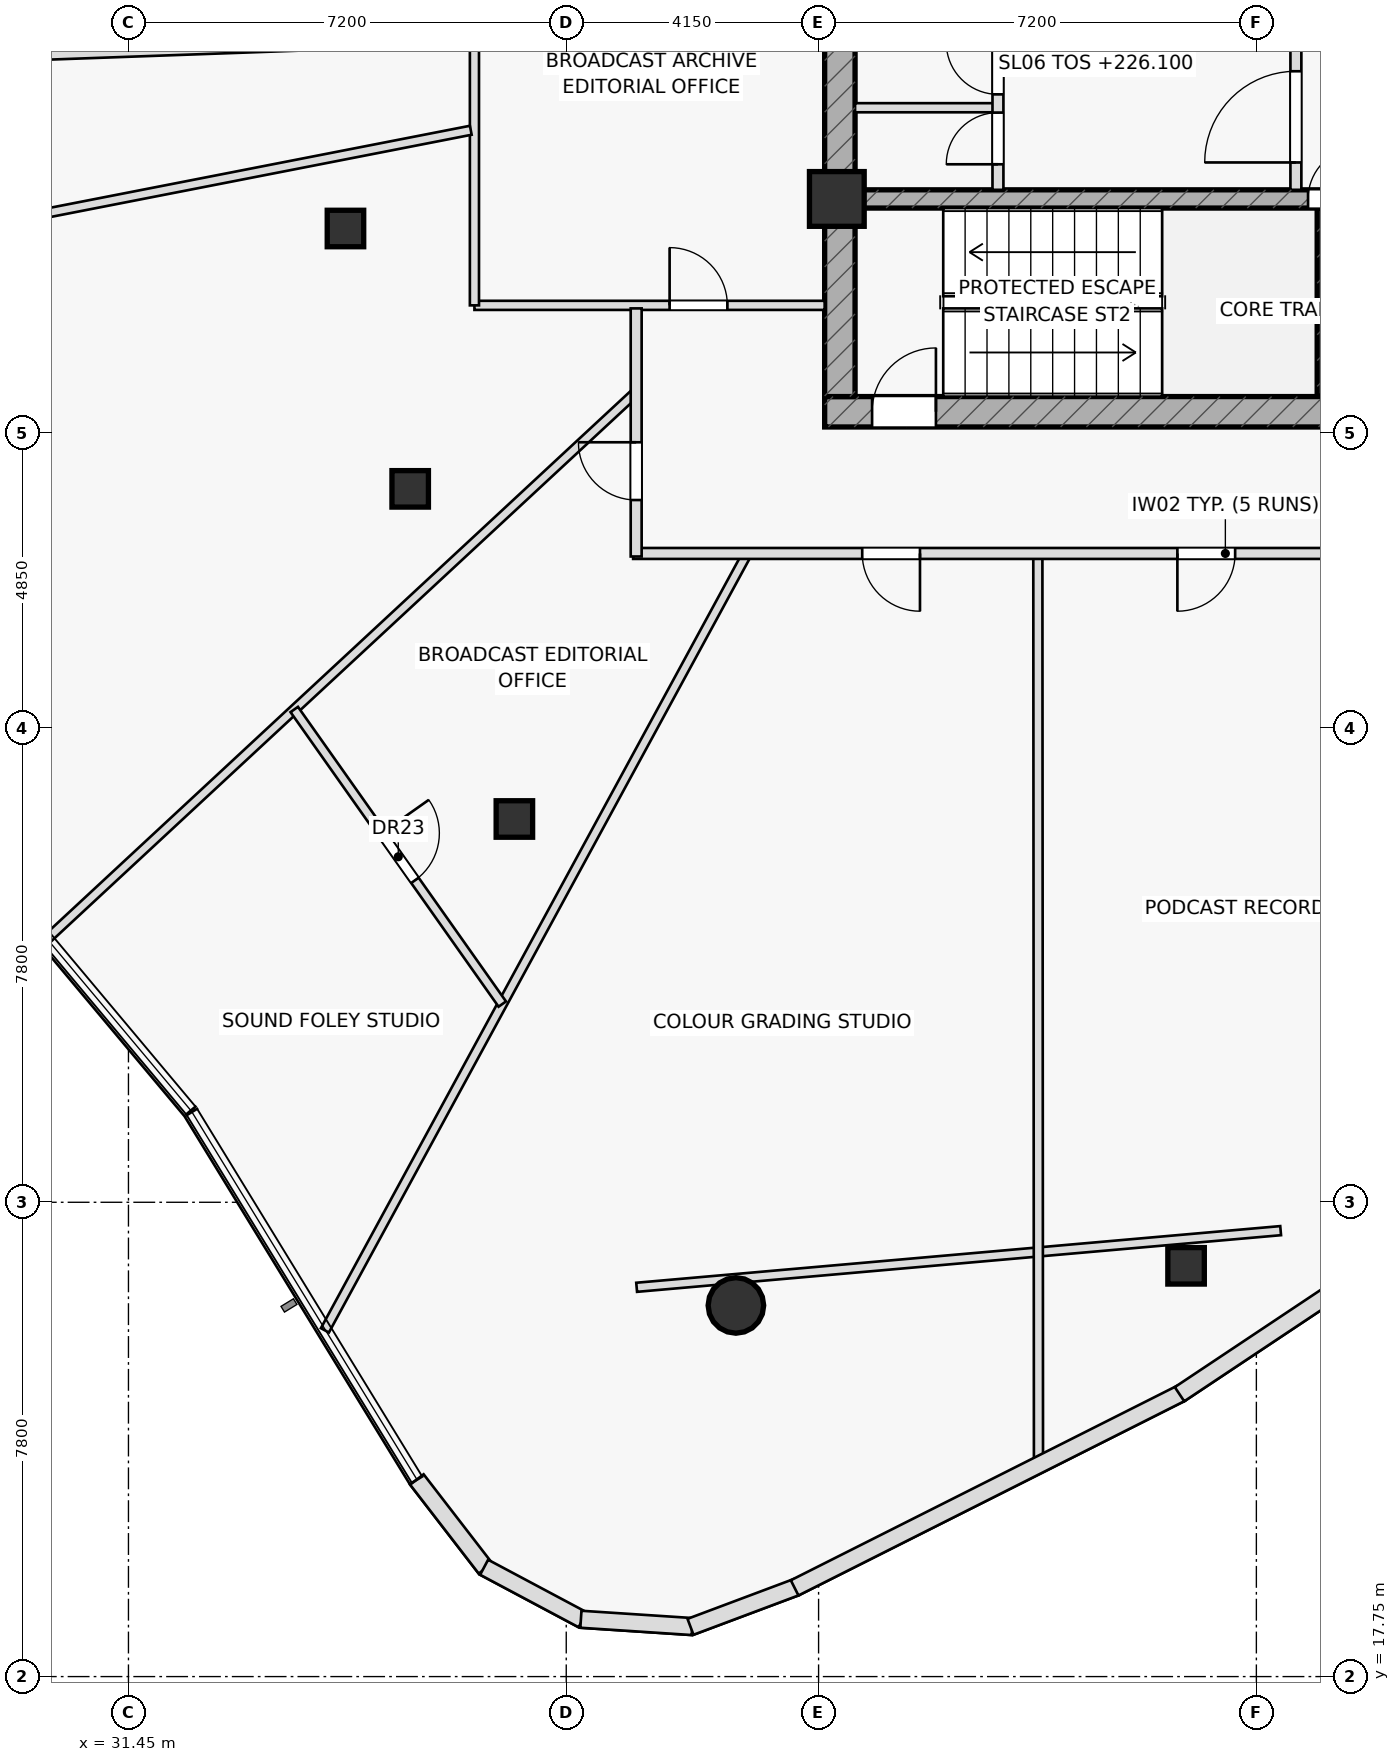
"""IFC4 building model, lengths in metres.
Left out: names, types, materials, properties, quantities, classifications, styles, units other than length and angle.
Written with IfcOpenShell. Run it as: python <this file> out.ifc"""

import sys

from ifc_helpers import new_model, si_unit, direction, frame, frame_2d, origin, origin_2d, place, context, subcontext, project, spatial, rectangle, hollow_rectangle, hollow_circle, extrude, element, fill, save


model = new_model("IFC4")
c1 = context("Model", 3, precision=1e-05, world=origin(), true_north=direction((0.0, 1.0)))
c2 = subcontext(c1, "Body", "Model", "MODEL_VIEW")
j1 = project(units=[si_unit("LENGTHUNIT", "METRE"), si_unit("PLANEANGLEUNIT", "RADIAN")], contexts=[c1])
p1 = place(None, origin())
s1 = spatial("IfcSite", under=j1, at=p1, CompositionType="ELEMENT")
p2 = place(p1, origin())
s2 = spatial("IfcBuilding", under=s1, at=p2, CompositionType="ELEMENT")
p3 = place(p2, frame((0.0, 0.0, 226.1)))
s3 = spatial("IfcBuildingStorey", under=s2, at=p3, CompositionType="ELEMENT", Elevation=226.1)
p4 = place(p3, frame((51.11, 38.8, 0.0), z_axis=(0.0, 0.0, 1.0), x_axis=(0.0, 1.0, 0.0)))
e1 = element("IfcWall", 1, at=p4, inside=s3, PredefinedType="SHEAR", context=c2, shape_type="SweptSolid", body=[
    extrude(rectangle(XDim=3.1, YDim=0.22, at=frame_2d((1.55, 0.0))), origin(), (0.0, 0.0, 1.0), 3.65),
])
p5 = place(p3, frame((42.9, 38.55, 0.0), z_axis=(0.0, 0.0, 1.0), x_axis=(1.0, 0.0, 0.0)))
e2 = element("IfcWall", 2, at=p5, inside=s3, PredefinedType="SHEAR", context=c2, shape_type="SweptSolid", body=[
    extrude(rectangle(XDim=14.2, YDim=0.5, at=frame_2d((7.1, 0.0))), origin(), (0.0, 0.0, 1.0), 3.65),
])
p6 = place(p5, frame((0.78, 0.0, 0.0)))
e3 = element("IfcOpeningElement", 3, at=p6, cuts=e2, PredefinedType="OPENING", context=c2, shape_type="SweptSolid", body=[
    extrude(rectangle(XDim=1.05, YDim=2.2, at=frame_2d((0.525, 1.1))), frame((0.0, 0.26, 0.0), z_axis=(0.0, -1.0, 0.0), x_axis=(1.0, 0.0, 0.0)), (0.0, 0.0, 1.0), 0.52),
])
p7 = place(p3, frame((43.15, 38.8, 0.0), z_axis=(0.0, 0.0, 1.0), x_axis=(0.0, 1.0, 0.0)))
e4 = element("IfcWall", 4, at=p7, inside=s3, PredefinedType="SHEAR", context=c2, shape_type="SweptSolid", body=[
    extrude(rectangle(XDim=12.4, YDim=0.5, at=frame_2d((6.2, 0.0))), origin(), (0.0, 0.0, 1.0), 3.65),
])
p8 = place(p3, frame((43.4, 42.05, 0.0), z_axis=(0.0, 0.0, 1.0), x_axis=(1.0, 0.0, 0.0)))
e5 = element("IfcWall", 5, at=p8, inside=s3, PredefinedType="SHEAR", context=c2, shape_type="SweptSolid", body=[
    extrude(rectangle(XDim=13.2, YDim=0.3, at=frame_2d((6.6, 0.0))), origin(), (0.0, 0.0, 1.0), 3.65),
])
p9 = place(p8, frame((7.45, 0.0, 0.0)))
e6 = element("IfcOpeningElement", 6, at=p9, cuts=e5, PredefinedType="OPENING", context=c2, shape_type="SweptSolid", body=[
    extrude(rectangle(XDim=0.85, YDim=2.05, at=frame_2d((0.425, 1.025))), frame((0.0, 0.16, 0.0), z_axis=(0.0, -1.0, 0.0), x_axis=(1.0, 0.0, 0.0)), (0.0, 0.0, 1.0), 0.32),
])
p10 = place(p8, frame((9.5, 0.0, 0.0)))
e7 = element("IfcOpeningElement", 7, at=p10, cuts=e5, PredefinedType="OPENING", context=c2, shape_type="SweptSolid", body=[
    extrude(rectangle(XDim=0.85, YDim=2.05, at=frame_2d((0.425, 1.025))), frame((0.0, 0.16, 0.0), z_axis=(0.0, -1.0, 0.0), x_axis=(1.0, 0.0, 0.0)), (0.0, 0.0, 1.0), 0.32),
])
p11 = place(p8, frame((11.6, 0.0, 0.0)))
e8 = element("IfcOpeningElement", 8, at=p11, cuts=e5, PredefinedType="OPENING", context=c2, shape_type="SweptSolid", body=[
    extrude(rectangle(XDim=0.85, YDim=2.05, at=frame_2d((0.425, 1.025))), frame((0.0, 0.16, 0.0), z_axis=(0.0, -1.0, 0.0), x_axis=(1.0, 0.0, 0.0)), (0.0, 0.0, 1.0), 0.32),
])
p12 = place(p3, frame((43.1, 42.05, 0.0), z_axis=(0.0, 0.0, 1.0), x_axis=(1.0, 0.0, 0.0)))
e9 = element("IfcColumn", 9, at=p12, inside=s3, PredefinedType="COLUMN", context=c2, shape_type="SweptSolid", body=[
    extrude(rectangle(XDim=0.9, YDim=0.9, at=origin_2d()), origin(), (0.0, 0.0, 1.0), 3.65),
])
for number, where, z_axis, x_axis in (
    (10, (35.019, 41.564, 0.0), (0.0, 0.0, 1.0), (1.0, 0.0, 0.0)),
    (11, (36.083, 37.282, 0.0), (0.0, 0.0, 1.0), (1.0, 0.0, 0.0)),
    (12, (37.797, 31.853, 0.0), (0.0, 0.0, 1.0), (1.0, 0.0, 0.0)),
):
    element("IfcColumn", number, at=place(p3, frame(where, z_axis=z_axis, x_axis=x_axis)), inside=s3, PredefinedType="COLUMN", context=c2, shape_type="SweptSolid", body=[
        extrude(hollow_rectangle(XDim=0.6, YDim=0.6, WallThickness=0.036, at=origin_2d()), origin(), (0.0, 0.0, 1.0), 3.65),
    ])
p13 = place(p3, frame((41.44, 23.854, 0.0), z_axis=(0.0, 0.0, 1.0), x_axis=(1.0, 0.0, 0.0)))
e13 = element("IfcColumn", 13, at=p13, inside=s3, PredefinedType="COLUMN", context=c2, shape_type="SweptSolid", body=[
    extrude(hollow_circle(Radius=0.457, WallThickness=0.04, at=origin_2d()), origin(), (0.0, 0.0, 1.0), 3.65),
])
p14 = place(p3, frame((48.844, 24.505, 0.0), z_axis=(0.0, 0.0, 1.0), x_axis=(1.0, 0.0, 0.0)))
e14 = element("IfcColumn", 14, at=p14, inside=s3, PredefinedType="COLUMN", context=c2, shape_type="SweptSolid", body=[
    extrude(hollow_rectangle(XDim=0.6, YDim=0.6, WallThickness=0.036, at=origin_2d()), origin(), (0.0, 0.0, 1.0), 3.65),
])
p15 = place(p3, frame((50.65, 42.2, 0.0), z_axis=(0.0, 0.0, 1.0), x_axis=(0.0, 1.0, 0.0)))
e15 = element("IfcWall", 15, at=p15, inside=s3, PredefinedType="PARTITIONING", context=c2, shape_type="SweptSolid", body=[
    extrude(rectangle(XDim=2.85, YDim=0.18, at=frame_2d((1.425, 0.0))), origin(), (0.0, 0.0, 1.0), 3.65),
])
p16 = place(p15, frame((0.45, 0.0, 0.0)))
e16 = element("IfcOpeningElement", 16, at=p16, cuts=e15, PredefinedType="OPENING", context=c2, shape_type="SweptSolid", body=[
    extrude(rectangle(XDim=1.5, YDim=2.2, at=frame_2d((0.75, 1.1))), frame((0.0, 0.1, 0.0), z_axis=(0.0, -1.0, 0.0), x_axis=(1.0, 0.0, 0.0)), (0.0, 0.0, 1.0), 0.2),
])
p17 = place(p3, frame((43.4, 43.55, 0.0), z_axis=(0.0, 0.0, 1.0), x_axis=(1.0, 0.0, 0.0)))
e17 = element("IfcWall", 17, at=p17, inside=s3, PredefinedType="PARTITIONING", context=c2, shape_type="SweptSolid", body=[
    extrude(rectangle(XDim=2.35, YDim=0.15, at=frame_2d((1.175, 0.0))), origin(), (0.0, 0.0, 1.0), 3.65),
])
p18 = place(p3, frame((45.75, 42.2, 0.0), z_axis=(0.0, 0.0, 1.0), x_axis=(0.0, 1.0, 0.0)))
e18 = element("IfcWall", 18, at=p18, inside=s3, PredefinedType="PARTITIONING", context=c2, shape_type="SweptSolid", body=[
    extrude(rectangle(XDim=5.6, YDim=0.18, at=frame_2d((2.8, 0.0))), origin(), (0.0, 0.0, 1.0), 3.65),
])
p19 = place(p18, frame((0.42, 0.0, 0.0)))
e19 = element("IfcOpeningElement", 19, at=p19, cuts=e18, PredefinedType="OPENING", context=c2, shape_type="SweptSolid", body=[
    extrude(rectangle(XDim=0.85, YDim=2.05, at=frame_2d((0.425, 1.025))), frame((0.0, 0.1, 0.0), z_axis=(0.0, -1.0, 0.0), x_axis=(1.0, 0.0, 0.0)), (0.0, 0.0, 1.0), 0.2),
])
p20 = place(p18, frame((1.57, 0.0, 0.0)))
e20 = element("IfcOpeningElement", 20, at=p20, cuts=e18, PredefinedType="OPENING", context=c2, shape_type="SweptSolid", body=[
    extrude(rectangle(XDim=0.85, YDim=2.05, at=frame_2d((0.425, 1.025))), frame((0.0, 0.1, 0.0), z_axis=(0.0, -1.0, 0.0), x_axis=(1.0, 0.0, 0.0)), (0.0, 0.0, 1.0), 0.2),
])
p21 = place(p18, frame((2.8, 0.0, 0.0)))
e21 = element("IfcOpeningElement", 21, at=p21, cuts=e18, PredefinedType="OPENING", context=c2, shape_type="SweptSolid", body=[
    extrude(rectangle(XDim=0.9, YDim=2.05, at=frame_2d((0.45, 1.025))), frame((0.0, 0.1, 0.0), z_axis=(0.0, -1.0, 0.0), x_axis=(1.0, 0.0, 0.0)), (0.0, 0.0, 1.0), 0.2),
])
p22 = place(p3, frame((39.808, 24.152, 0.0), z_axis=(0.0, 0.0, 1.0), x_axis=(0.996153584085, 0.087624408208, 0.0)))
e22 = element("IfcWall", 22, at=p22, inside=s3, PredefinedType="PARTITIONING", context=c2, shape_type="SweptSolid", body=[
    extrude(rectangle(XDim=10.632, YDim=0.15, at=frame_2d((5.316, 0.0))), origin(), (0.0, 0.0, 1.0), 3.135),
])
p23 = place(p3, frame((37.14, 40.3, 0.0), z_axis=(0.0, 0.0, 1.0), x_axis=(1.0, 0.0, 0.0)))
e23 = element("IfcWall", 23, at=p23, inside=s3, PredefinedType="PARTITIONING", context=c2, shape_type="SweptSolid", body=[
    extrude(rectangle(XDim=5.76, YDim=0.15, at=frame_2d((2.88, 0.0))), origin(), (0.0, 0.0, 1.0), 3.025),
])
p24 = place(p23, frame((3.21, 0.0, 0.0)))
e24 = element("IfcOpeningElement", 24, at=p24, cuts=e23, PredefinedType="OPENING", context=c2, shape_type="SweptSolid", body=[
    extrude(rectangle(XDim=0.95, YDim=2.05, at=frame_2d((0.475, 1.025))), frame((0.0, 0.085, 0.0), z_axis=(0.0, -1.0, 0.0), x_axis=(1.0, 0.0, 0.0)), (0.0, 0.0, 1.0), 0.17),
])
p25 = place(p3, frame((37.14, 40.3, 0.0), z_axis=(0.0, 0.0, 1.0), x_axis=(0.0, 1.0, 0.0)))
e25 = element("IfcWall", 25, at=p25, inside=s3, PredefinedType="PARTITIONING", context=c2, shape_type="SweptSolid", body=[
    extrude(rectangle(XDim=7.58, YDim=0.15, at=frame_2d((3.79, 0.0))), origin(), (0.0, 0.0, 1.0), 3.65),
])
p26 = place(p3, frame((37.08, 44.665, 0.0), z_axis=(0.0, 0.0, 1.0), x_axis=(-0.999354882677, -0.035914042805, 0.0)))
e26 = element("IfcWall", 26, at=p26, inside=s3, PredefinedType="PARTITIONING", context=c2, shape_type="SweptSolid", body=[
    extrude(rectangle(XDim=12.562, YDim=0.15, at=frame_2d((6.281, 0.0))), origin(), (0.0, 0.0, 1.0), 3.135),
])
p27 = place(p3, frame((37.08, 43.179, 0.0), z_axis=(0.0, 0.0, 1.0), x_axis=(-0.981454920946, -0.19169308321, 0.0)))
e27 = element("IfcWall", 27, at=p27, inside=s3, PredefinedType="PARTITIONING", context=c2, shape_type="SweptSolid", body=[
    extrude(rectangle(XDim=12.149, YDim=0.15, at=frame_2d((6.074, 0.0))), origin(), (0.0, 0.0, 1.0), 3.135),
])
p28 = place(p3, frame((39.8, 38.874, 0.0), z_axis=(0.0, 0.0, 1.0), x_axis=(-0.732917057611, -0.680318004071, 0.0)))
e28 = element("IfcWall", 28, at=p28, inside=s3, PredefinedType="PARTITIONING", context=c2, shape_type="SweptSolid", body=[
    extrude(rectangle(XDim=13.228, YDim=0.15, at=frame_2d((6.614, 0.0))), origin(), (0.0, 0.0, 1.0), 3.025),
])
p29 = place(p3, frame((41.627, 36.22, 0.0), z_axis=(0.0, 0.0, 1.0), x_axis=(-0.477626014046, -0.878563253674, 0.0)))
e29 = element("IfcWall", 29, at=p29, inside=s3, PredefinedType="PARTITIONING", context=c2, shape_type="SweptSolid", body=[
    extrude(rectangle(XDim=14.542, YDim=0.15, at=frame_2d((7.271, 0.0))), origin(), (0.0, 0.0, 1.0), 3.135),
])
p30 = place(p3, frame((46.406, 36.22, 0.0), z_axis=(0.0, 0.0, 1.0), x_axis=(0.000683437859, -0.999999766456, 0.0)))
e30 = element("IfcWall", 30, at=p30, inside=s3, PredefinedType="PARTITIONING", context=c2, shape_type="SweptSolid", body=[
    extrude(rectangle(XDim=15.003, YDim=0.15, at=frame_2d((7.502, 0.0))), origin(), (0.0, 0.0, 1.0), 3.025),
])
p31 = place(p3, frame((34.177, 33.654, 0.0), z_axis=(0.0, 0.0, 1.0), x_axis=(0.57689975021, -0.816814959588, 0.0)))
e31 = element("IfcWall", 31, at=p31, inside=s3, PredefinedType="PARTITIONING", context=c2, shape_type="SweptSolid", body=[
    extrude(rectangle(XDim=5.931, YDim=0.15, at=frame_2d((2.965, 0.0))), origin(), (0.0, 0.0, 1.0), 3.65),
])
p32 = place(p31, frame((2.49, 0.0, 0.0)))
e32 = element("IfcOpeningElement", 32, at=p32, cuts=e31, PredefinedType="OPENING", context=c2, shape_type="SweptSolid", body=[
    extrude(rectangle(XDim=0.95, YDim=2.05, at=frame_2d((0.475, 1.025))), frame((0.0, 0.085, 0.0), z_axis=(0.0, -1.0, 0.0), x_axis=(1.0, 0.0, 0.0)), (0.0, 0.0, 1.0), 0.17),
])
p33 = place(p3, frame((59.23, 36.22, 0.0), z_axis=(0.0, 0.0, 1.0), x_axis=(-1.0, 0.0, 0.0)))
e33 = element("IfcWall", 33, at=p33, inside=s3, PredefinedType="PARTITIONING", context=c2, shape_type="SweptSolid", body=[
    extrude(rectangle(XDim=19.48, YDim=0.18, at=frame_2d((9.74, 0.0))), origin(), (0.0, 0.0, 1.0), 3.025),
])
p34 = place(p33, frame((3.666, 0.0, 0.0)))
e34 = element("IfcOpeningElement", 34, at=p34, cuts=e33, PredefinedType="OPENING", context=c2, shape_type="SweptSolid", body=[
    extrude(rectangle(XDim=0.95, YDim=2.05, at=frame_2d((0.475, 1.025))), frame((0.0, 0.1, 0.0), z_axis=(0.0, -1.0, 0.0), x_axis=(1.0, 0.0, 0.0)), (0.0, 0.0, 1.0), 0.2),
])
p35 = place(p33, frame((9.579, 0.0, 0.0)))
e35 = element("IfcOpeningElement", 35, at=p35, cuts=e33, PredefinedType="OPENING", context=c2, shape_type="SweptSolid", body=[
    extrude(rectangle(XDim=0.95, YDim=2.05, at=frame_2d((0.475, 1.025))), frame((0.0, 0.1, 0.0), z_axis=(0.0, -1.0, 0.0), x_axis=(1.0, 0.0, 0.0)), (0.0, 0.0, 1.0), 0.2),
])
p36 = place(p33, frame((14.762, 0.0, 0.0)))
e36 = element("IfcOpeningElement", 36, at=p36, cuts=e33, PredefinedType="OPENING", context=c2, shape_type="SweptSolid", body=[
    extrude(rectangle(XDim=0.95, YDim=2.05, at=frame_2d((0.475, 1.025))), frame((0.0, 0.1, 0.0), z_axis=(0.0, -1.0, 0.0), x_axis=(1.0, 0.0, 0.0)), (0.0, 0.0, 1.0), 0.2),
])
p37 = place(p3, frame((39.8, 36.17, 0.0), z_axis=(0.0, 0.0, 1.0), x_axis=(0.0, 1.0, 0.0)))
e37 = element("IfcWall", 37, at=p37, inside=s3, PredefinedType="PARTITIONING", context=c2, shape_type="SweptSolid", body=[
    extrude(rectangle(XDim=4.08, YDim=0.18, at=frame_2d((2.04, 0.0))), origin(), (0.0, 0.0, 1.0), 3.325),
])
p38 = place(p37, frame((0.929, 0.0, 0.0)))
e38 = element("IfcOpeningElement", 38, at=p38, cuts=e37, PredefinedType="OPENING", context=c2, shape_type="SweptSolid", body=[
    extrude(rectangle(XDim=0.95, YDim=2.05, at=frame_2d((0.475, 1.025))), frame((0.0, 0.1, 0.0), z_axis=(0.0, -1.0, 0.0), x_axis=(1.0, 0.0, 0.0)), (0.0, 0.0, 1.0), 0.2),
])
p39 = place(p3, frame((36.193, 20.991, 0.0), z_axis=(0.0, 0.0, 1.0), x_axis=(0.610815292471, -0.791773123112, 0.0)))
e39 = element("IfcWall", 39, at=p39, inside=s3, PredefinedType="STANDARD", context=c2, shape_type="SweptSolid", body=[
    extrude(rectangle(XDim=1.847, YDim=0.28, at=frame_2d((0.923, 0.0))), origin(), (0.0, 0.0, 1.0), 3.65),
])
p40 = place(p3, frame((37.299, 19.548, 0.0), z_axis=(0.0, 0.0, 1.0), x_axis=(0.882555373854, -0.470208477253, 0.0)))
e40 = element("IfcWall", 40, at=p40, inside=s3, PredefinedType="STANDARD", context=c2, shape_type="SweptSolid", body=[
    extrude(rectangle(XDim=1.835, YDim=0.28, at=frame_2d((0.918, 0.0))), origin(), (0.0, 0.0, 1.0), 3.65),
])
p41 = place(p3, frame((38.891, 18.693, 0.0), z_axis=(0.0, 0.0, 1.0), x_axis=(0.997855809763, -0.065450614372, 0.0)))
e41 = element("IfcWall", 41, at=p41, inside=s3, PredefinedType="STANDARD", context=c2, shape_type="SweptSolid", body=[
    extrude(rectangle(XDim=1.835, YDim=0.28, at=frame_2d((0.917, 0.0))), origin(), (0.0, 0.0, 1.0), 3.65),
])
p42 = place(p3, frame((40.694, 18.569, 0.0), z_axis=(0.0, 0.0, 1.0), x_axis=(0.936383168039, 0.350979433319, 0.0)))
e42 = element("IfcWall", 42, at=p42, inside=s3, PredefinedType="STANDARD", context=c2, shape_type="SweptSolid", body=[
    extrude(rectangle(XDim=1.858, YDim=0.28, at=frame_2d((0.929, 0.0))), origin(), (0.0, 0.0, 1.0), 3.65),
])
p43 = place(p3, frame((42.406, 19.209, 0.0), z_axis=(0.0, 0.0, 1.0), x_axis=(0.893181734269, 0.449695885648, 0.0)))
e43 = element("IfcWall", 43, at=p43, inside=s3, PredefinedType="STANDARD", context=c2, shape_type="SweptSolid", body=[
    extrude(rectangle(XDim=7.116, YDim=0.28, at=frame_2d((3.558, 0.0))), origin(), (0.0, 0.0, 1.0), 3.65),
])
p44 = place(p3, frame((48.736, 22.394, 0.0), z_axis=(0.0, 0.0, 1.0), x_axis=(0.832187740949, 0.554493970945, 0.0)))
e44 = element("IfcWall", 44, at=p44, inside=s3, PredefinedType="STANDARD", context=c2, shape_type="SweptSolid", body=[
    extrude(rectangle(XDim=7.104, YDim=0.28, at=frame_2d((3.552, 0.0))), origin(), (0.0, 0.0, 1.0), 3.65),
])
p45 = place(p6, origin())
e45 = element("IfcDoor", 45, at=p45, inside=s3, OperationType="SINGLE_SWING_RIGHT", PredefinedType="DOOR", context=c2, shape_type="SweptSolid", body=[
    extrude(rectangle(XDim=1.05, YDim=2.2, at=frame_2d((0.525, 1.1))), frame((0.0, 0.025, 0.0), z_axis=(0.0, -1.0, 0.0), x_axis=(1.0, 0.0, 0.0)), (0.0, 0.0, 1.0), 0.05),
])
fill(e3, e45)
p46 = place(p16, origin())
e46 = element("IfcDoor", 46, at=p46, inside=s3, OperationType="SINGLE_SWING_LEFT", PredefinedType="DOOR", context=c2, shape_type="SweptSolid", body=[
    extrude(rectangle(XDim=1.5, YDim=2.2, at=frame_2d((0.75, 1.1))), frame((0.0, 0.025, 0.0), z_axis=(0.0, -1.0, 0.0), x_axis=(1.0, 0.0, 0.0)), (0.0, 0.0, 1.0), 0.05),
])
fill(e16, e46)
p47 = place(p9, origin())
e47 = element("IfcDoor", 47, at=p47, inside=s3, OperationType="SINGLE_SWING_RIGHT", PredefinedType="DOOR", context=c2, shape_type="SweptSolid", body=[
    extrude(rectangle(XDim=0.85, YDim=2.05, at=frame_2d((0.425, 1.025))), frame((0.0, 0.025, 0.0), z_axis=(0.0, -1.0, 0.0), x_axis=(1.0, 0.0, 0.0)), (0.0, 0.0, 1.0), 0.05),
])
fill(e6, e47)
p48 = place(p19, origin())
e48 = element("IfcDoor", 48, at=p48, inside=s3, OperationType="SINGLE_SWING_LEFT", PredefinedType="DOOR", context=c2, shape_type="SweptSolid", body=[
    extrude(rectangle(XDim=0.85, YDim=2.05, at=frame_2d((0.425, 1.025))), frame((0.0, 0.025, 0.0), z_axis=(0.0, -1.0, 0.0), x_axis=(1.0, 0.0, 0.0)), (0.0, 0.0, 1.0), 0.05),
])
fill(e19, e48)
p49 = place(p20, origin())
e49 = element("IfcDoor", 49, at=p49, inside=s3, OperationType="SINGLE_SWING_RIGHT", PredefinedType="DOOR", context=c2, shape_type="SweptSolid", body=[
    extrude(rectangle(XDim=0.85, YDim=2.05, at=frame_2d((0.425, 1.025))), frame((0.0, 0.025, 0.0), z_axis=(0.0, -1.0, 0.0), x_axis=(1.0, 0.0, 0.0)), (0.0, 0.0, 1.0), 0.05),
])
fill(e20, e49)
p50 = place(p24, origin())
e50 = element("IfcDoor", 50, at=p50, inside=s3, OperationType="SINGLE_SWING_LEFT", PredefinedType="DOOR", context=c2, shape_type="SweptSolid", body=[
    extrude(rectangle(XDim=0.95, YDim=2.05, at=frame_2d((0.475, 1.025))), frame((0.0, 0.025, 0.0), z_axis=(0.0, -1.0, 0.0), x_axis=(1.0, 0.0, 0.0)), (0.0, 0.0, 1.0), 0.05),
])
fill(e24, e50)
p51 = place(p32, origin())
e51 = element("IfcDoor", 51, at=p51, inside=s3, OperationType="SINGLE_SWING_LEFT", PredefinedType="DOOR", context=c2, shape_type="SweptSolid", body=[
    extrude(rectangle(XDim=0.95, YDim=2.05, at=frame_2d((0.475, 1.025))), frame((0.0, 0.025, 0.0), z_axis=(0.0, -1.0, 0.0), x_axis=(1.0, 0.0, 0.0)), (0.0, 0.0, 1.0), 0.05),
])
fill(e32, e51)
p52 = place(p35, origin())
e52 = element("IfcDoor", 52, at=p52, inside=s3, OperationType="SINGLE_SWING_RIGHT", PredefinedType="DOOR", context=c2, shape_type="SweptSolid", body=[
    extrude(rectangle(XDim=0.95, YDim=2.05, at=frame_2d((0.475, 1.025))), frame((0.0, 0.025, 0.0), z_axis=(0.0, -1.0, 0.0), x_axis=(1.0, 0.0, 0.0)), (0.0, 0.0, 1.0), 0.05),
])
fill(e35, e52)
p53 = place(p36, origin())
e53 = element("IfcDoor", 53, at=p53, inside=s3, OperationType="SINGLE_SWING_LEFT", PredefinedType="DOOR", context=c2, shape_type="SweptSolid", body=[
    extrude(rectangle(XDim=0.95, YDim=2.05, at=frame_2d((0.475, 1.025))), frame((0.0, 0.025, 0.0), z_axis=(0.0, -1.0, 0.0), x_axis=(1.0, 0.0, 0.0)), (0.0, 0.0, 1.0), 0.05),
])
fill(e36, e53)
p54 = place(p38, origin())
e54 = element("IfcDoor", 54, at=p54, inside=s3, OperationType="SINGLE_SWING_RIGHT", PredefinedType="DOOR", context=c2, shape_type="SweptSolid", body=[
    extrude(rectangle(XDim=0.95, YDim=2.05, at=frame_2d((0.475, 1.025))), frame((0.0, 0.025, 0.0), z_axis=(0.0, -1.0, 0.0), x_axis=(1.0, 0.0, 0.0)), (0.0, 0.0, 1.0), 0.05),
])
fill(e38, e54)
save(model, sys.argv[1])
